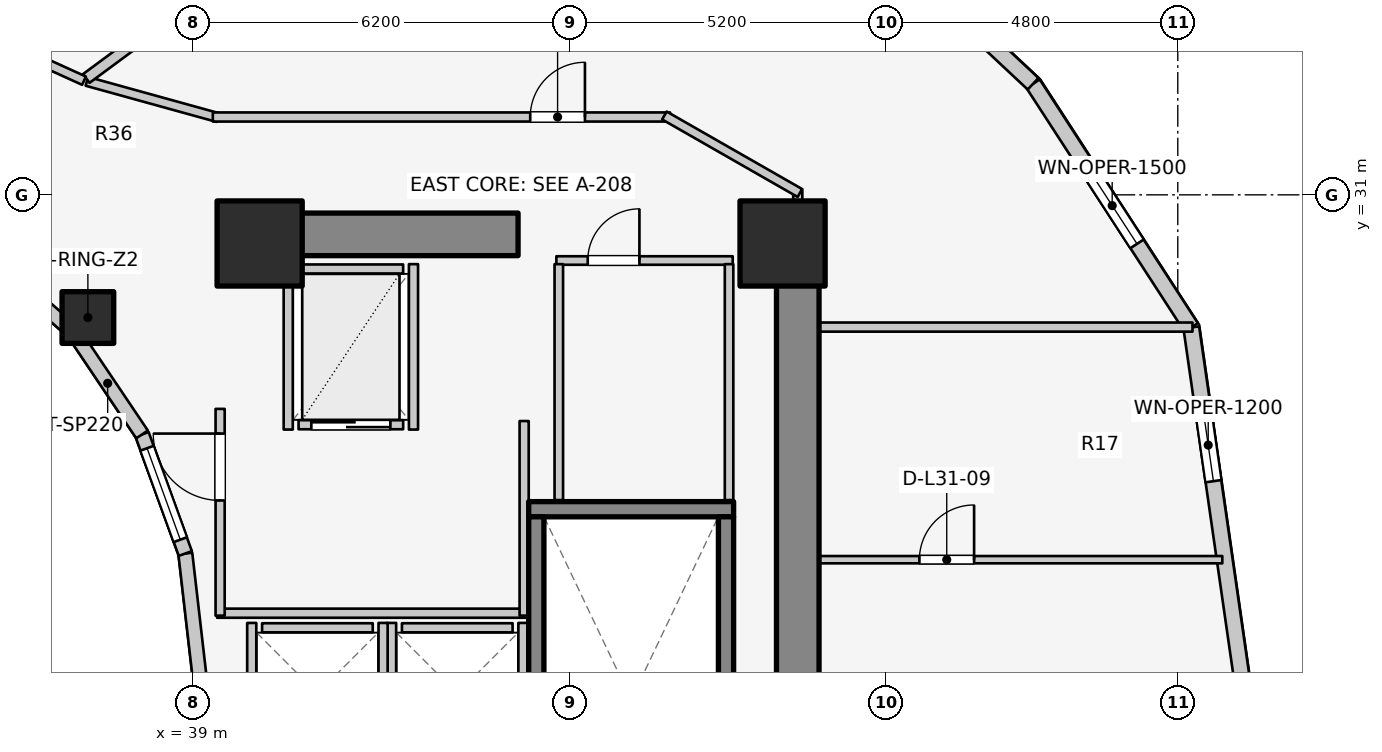
"""IFC4 building model, lengths in metres.
Left out: names, types, materials, properties, quantities, classifications, styles, units other than length and angle.
Written with IfcOpenShell. Run it as: python <this file> out.ifc"""

import sys

from ifc_helpers import new_model, si_unit, direction, frame, frame_2d, origin, origin_2d, place, context, subcontext, project, spatial, rectangle, extrude, element, fill, save


model = new_model("IFC4")
c1 = context("Model", 3, precision=1e-05, world=origin(), true_north=direction((0.0, 1.0)))
c2 = subcontext(c1, "Body", "Model", "MODEL_VIEW")
j1 = project(units=[si_unit("LENGTHUNIT", "METRE"), si_unit("PLANEANGLEUNIT", "RADIAN")], contexts=[c1])
p1 = place(None, origin())
s1 = spatial("IfcSite", under=j1, at=p1, CompositionType="ELEMENT")
p2 = place(p1, origin())
s2 = spatial("IfcBuilding", under=s1, at=p2, CompositionType="ELEMENT")
p3 = place(p2, frame((0.0, 0.0, 104.2)))
s3 = spatial("IfcBuildingStorey", under=s2, at=p3, CompositionType="ELEMENT", Elevation=104.2)
p4 = place(p3, frame((48.95, 17.05, 0.0), z_axis=(0.0, 0.0, 1.0), x_axis=(0.0, 1.0, 0.0)))
e1 = element("IfcWall", 1, at=p4, inside=s3, PredefinedType="SHEAR", context=c2, shape_type="SweptSolid", body=[
    extrude(rectangle(XDim=12.8, YDim=0.7, at=frame_2d((6.4, 0.0))), origin(), (0.0, 0.0, 1.0), 3.1),
])
p5 = place(p3, frame((39.85, 30.35, 0.0), z_axis=(0.0, 0.0, 1.0), x_axis=(1.0, 0.0, 0.0)))
e2 = element("IfcWall", 2, at=p5, inside=s3, PredefinedType="SHEAR", context=c2, shape_type="SweptSolid", body=[
    extrude(rectangle(XDim=4.5, YDim=0.7, at=frame_2d((2.25, 0.0))), origin(), (0.0, 0.0, 1.0), 3.1),
])
p6 = place(p3, frame((44.525, 25.83, 0.0), z_axis=(0.0, 0.0, 1.0), x_axis=(1.0, 0.0, 0.0)))
e3 = element("IfcWall", 3, at=p6, inside=s3, PredefinedType="SOLIDWALL", context=c2, shape_type="SweptSolid", body=[
    extrude(rectangle(XDim=3.37, YDim=0.25, at=frame_2d((1.685, 0.0))), origin(), (0.0, 0.0, 1.0), 3.1),
])
for number, where, z_axis, x_axis in (
    (4, (44.65, 17.895, 0.0), (0.0, 0.0, 1.0), (0.0, 1.0, 0.0)),
    (5, (47.77, 17.895, 0.0), (0.0, 0.0, 1.0), (0.0, 1.0, 0.0)),
):
    element("IfcWall", number, at=place(p3, frame(where, z_axis=z_axis, x_axis=x_axis)), inside=s3, PredefinedType="SOLIDWALL", context=c2, shape_type="SweptSolid", body=[
        extrude(rectangle(XDim=7.81, YDim=0.25, at=frame_2d((3.905, 0.0))), origin(), (0.0, 0.0, 1.0), 3.1),
    ])
for number, where, z_axis, x_axis in (
    (6, (48.7, 30.2, 0.0), (0.0, 0.0, 1.0), (1.0, 0.0, 0.0)),
    (7, (40.1, 30.2, 0.0), (0.0, 0.0, 1.0), (1.0, 0.0, 0.0)),
):
    element("IfcColumn", number, at=place(p3, frame(where, z_axis=z_axis, x_axis=x_axis)), inside=s3, PredefinedType="COLUMN", context=c2, shape_type="SweptSolid", body=[
        extrude(rectangle(XDim=1.4, YDim=1.4, at=origin_2d()), origin(), (0.0, 0.0, 1.0), 3.1),
    ])
p7 = place(p3, frame((37.275, 28.982, 0.0), z_axis=(0.0, 0.0, 1.0), x_axis=(1.0, 0.0, 0.0)))
e8 = element("IfcColumn", 8, at=p7, inside=s3, PredefinedType="COLUMN", context=c2, shape_type="SweptSolid", body=[
    extrude(rectangle(XDim=0.85, YDim=0.85, at=origin_2d()), origin(), (0.0, 0.0, 1.0), 3.1),
])
p8 = place(p3, frame((39.12, 23.0, 0.0), z_axis=(0.0, 0.0, 1.0), x_axis=(-0.114711713601, 0.993398823617, 0.0)))
e9 = element("IfcWall", 9, at=p8, inside=s3, PredefinedType="STANDARD", context=c2, shape_type="SweptSolid", body=[
    extrude(rectangle(XDim=2.115, YDim=0.23, at=frame_2d((1.058, 0.0))), origin(), (0.0, 0.0, 1.0), 2.84),
])
p9 = place(p3, frame((38.877, 25.102, 0.0), z_axis=(0.0, 0.0, 1.0), x_axis=(-0.341423187295, 0.93990968033, 0.0)))
e10 = element("IfcWall", 10, at=p9, inside=s3, PredefinedType="STANDARD", context=c2, shape_type="SweptSolid", body=[
    extrude(rectangle(XDim=2.084, YDim=0.23, at=frame_2d((1.042, 0.0))), origin(), (0.0, 0.0, 1.0), 2.84),
])
p10 = place(p9, frame((0.242, 0.0, 0.85)))
e11 = element("IfcOpeningElement", 11, at=p10, cuts=e10, PredefinedType="OPENING", context=c2, shape_type="SweptSolid", body=[
    extrude(rectangle(XDim=1.6, YDim=1.65, at=frame_2d((0.8, 0.825))), frame((0.0, 0.125, 0.0), z_axis=(0.0, -1.0, 0.0), x_axis=(1.0, 0.0, 0.0)), (0.0, 0.0, 1.0), 0.25),
])
p11 = place(p3, frame((38.166, 27.06, 0.0), z_axis=(0.0, 0.0, 1.0), x_axis=(-0.558197800898, 0.829707909492, 0.0)))
e12 = element("IfcWall", 12, at=p11, inside=s3, PredefinedType="STANDARD", context=c2, shape_type="SweptSolid", body=[
    extrude(rectangle(XDim=2.027, YDim=0.23, at=frame_2d((1.013, 0.0))), origin(), (0.0, 0.0, 1.0), 2.16),
])
p12 = place(p3, frame((37.035, 28.742, 0.0), z_axis=(0.0, 0.0, 1.0), x_axis=(-0.752576694707, 0.658504607869, 0.0)))
e13 = element("IfcWall", 13, at=p12, inside=s3, PredefinedType="STANDARD", context=c2, shape_type="SweptSolid", body=[
    extrude(rectangle(XDim=1.959, YDim=0.23, at=frame_2d((0.98, 0.0))), origin(), (0.0, 0.0, 1.0), 2.16),
])
p13 = place(p3, frame((56.26, 23.0, 0.0), z_axis=(0.0, 0.0, 1.0), x_axis=(-0.142572472068, 0.98978436551, 0.0)))
e14 = element("IfcWall", 14, at=p13, inside=s3, PredefinedType="STANDARD", context=c2, shape_type="SweptSolid", body=[
    extrude(rectangle(XDim=5.879, YDim=0.26, at=frame_2d((2.939, 0.0))), origin(), (0.0, 0.0, 1.0), 2.85),
])
p14 = place(p13, frame((3.325, 0.0, 0.75)))
e15 = element("IfcOpeningElement", 15, at=p14, cuts=e14, PredefinedType="OPENING", context=c2, shape_type="SweptSolid", body=[
    extrude(rectangle(XDim=1.2, YDim=1.5, at=frame_2d((0.6, 0.75))), frame((0.0, 0.14, 0.0), z_axis=(0.0, -1.0, 0.0), x_axis=(1.0, 0.0, 0.0)), (0.0, 0.0, 1.0), 0.28),
])
p15 = place(p3, frame((55.422, 28.819, 0.0), z_axis=(0.0, 0.0, 1.0), x_axis=(-0.544388392991, 0.838833283541, 0.0)))
e16 = element("IfcWall", 16, at=p15, inside=s3, PredefinedType="STANDARD", context=c2, shape_type="SweptSolid", body=[
    extrude(rectangle(XDim=4.778, YDim=0.26, at=frame_2d((2.389, 0.0))), origin(), (0.0, 0.0, 1.0), 2.85),
])
p16 = place(p15, frame((1.639, 0.0, 0.75)))
e17 = element("IfcOpeningElement", 17, at=p16, cuts=e16, PredefinedType="OPENING", context=c2, shape_type="SweptSolid", body=[
    extrude(rectangle(XDim=1.5, YDim=1.6, at=frame_2d((0.75, 0.8))), frame((0.0, 0.14, 0.0), z_axis=(0.0, -1.0, 0.0), x_axis=(1.0, 0.0, 0.0)), (0.0, 0.0, 1.0), 0.28),
])
p17 = place(p3, frame((52.821, 32.827, 0.0), z_axis=(0.0, 0.0, 1.0), x_axis=(-0.730162452258, 0.68327358599, 0.0)))
e18 = element("IfcWall", 18, at=p17, inside=s3, PredefinedType="STANDARD", context=c2, shape_type="SweptSolid", body=[
    extrude(rectangle(XDim=4.868, YDim=0.26, at=frame_2d((2.434, 0.0))), origin(), (0.0, 0.0, 1.0), 2.85),
])
p18 = place(p17, frame((1.234, 0.0, 0.75)))
e19 = element("IfcOpeningElement", 19, at=p18, cuts=e18, PredefinedType="OPENING", context=c2, shape_type="SweptSolid", body=[
    extrude(rectangle(XDim=2.4, YDim=1.7, at=frame_2d((1.2, 0.85))), frame((0.0, 0.14, 0.0), z_axis=(0.0, -1.0, 0.0), x_axis=(1.0, 0.0, 0.0)), (0.0, 0.0, 1.0), 0.28),
])
p19 = place(p3, frame((42.44, 23.88, 0.0), z_axis=(0.0, 0.0, 1.0), x_axis=(1.0, 0.0, 0.0)))
e20 = element("IfcWall", 20, at=p19, inside=s3, PredefinedType="SOLIDWALL", context=c2, shape_type="SweptSolid", body=[
    extrude(rectangle(XDim=1.82, YDim=0.15, at=frame_2d((0.91, 0.0))), origin(), (0.0, 0.0, 1.0), 2.855),
])
for number, where, z_axis, x_axis in (
    (21, (42.27, 21.64, 0.0), (0.0, 0.0, 1.0), (0.0, 1.0, 0.0)),
    (22, (44.43, 21.64, 0.0), (0.0, 0.0, 1.0), (0.0, 1.0, 0.0)),
):
    element("IfcWall", number, at=place(p3, frame(where, z_axis=z_axis, x_axis=x_axis)), inside=s3, PredefinedType="SOLIDWALL", context=c2, shape_type="SweptSolid", body=[
        extrude(rectangle(XDim=2.32, YDim=0.15, at=frame_2d((1.16, 0.0))), origin(), (0.0, 0.0, 1.0), 2.855),
    ])
p20 = place(p3, frame((40.14, 23.88, 0.0), z_axis=(0.0, 0.0, 1.0), x_axis=(1.0, 0.0, 0.0)))
e23 = element("IfcWall", 23, at=p20, inside=s3, PredefinedType="SOLIDWALL", context=c2, shape_type="SweptSolid", body=[
    extrude(rectangle(XDim=1.82, YDim=0.15, at=frame_2d((0.91, 0.0))), origin(), (0.0, 0.0, 1.0), 2.12),
])
p21 = place(p3, frame((39.97, 21.64, 0.0), z_axis=(0.0, 0.0, 1.0), x_axis=(0.0, 1.0, 0.0)))
e24 = element("IfcWall", 24, at=p21, inside=s3, PredefinedType="SOLIDWALL", context=c2, shape_type="SweptSolid", body=[
    extrude(rectangle(XDim=2.32, YDim=0.15, at=frame_2d((1.16, 0.0))), origin(), (0.0, 0.0, 1.0), 2.12),
])
p22 = place(p3, frame((42.13, 21.64, 0.0), z_axis=(0.0, 0.0, 1.0), x_axis=(0.0, 1.0, 0.0)))
e25 = element("IfcWall", 25, at=p22, inside=s3, PredefinedType="SOLIDWALL", context=c2, shape_type="SweptSolid", body=[
    extrude(rectangle(XDim=2.32, YDim=0.15, at=frame_2d((1.16, 0.0))), origin(), (0.0, 0.0, 1.0), 2.855),
])
p23 = place(p3, frame((40.74, 27.22, 0.0), z_axis=(0.0, 0.0, 1.0), x_axis=(1.0, 0.0, 0.0)))
e26 = element("IfcWall", 26, at=p23, inside=s3, PredefinedType="SOLIDWALL", context=c2, shape_type="SweptSolid", body=[
    extrude(rectangle(XDim=1.72, YDim=0.15, at=frame_2d((0.86, 0.0))), origin(), (0.0, 0.0, 1.0), 2.855),
])
p24 = place(p23, frame((0.21, 0.0, 0.0)))
e27 = element("IfcOpeningElement", 27, at=p24, cuts=e26, PredefinedType="OPENING", context=c2, shape_type="SweptSolid", body=[
    extrude(rectangle(XDim=1.3, YDim=2.1, at=frame_2d((0.65, 1.05))), frame((0.0, 0.085, 0.0), z_axis=(0.0, -1.0, 0.0), x_axis=(1.0, 0.0, 0.0)), (0.0, 0.0, 1.0), 0.17),
])
p25 = place(p3, frame((40.74, 29.78, 0.0), z_axis=(0.0, 0.0, 1.0), x_axis=(1.0, 0.0, 0.0)))
e28 = element("IfcWall", 28, at=p25, inside=s3, PredefinedType="SOLIDWALL", context=c2, shape_type="SweptSolid", body=[
    extrude(rectangle(XDim=1.72, YDim=0.15, at=frame_2d((0.86, 0.0))), origin(), (0.0, 0.0, 1.0), 2.855),
])
for number, where, z_axis, x_axis in (
    (29, (40.57, 27.14, 0.0), (0.0, 0.0, 1.0), (0.0, 1.0, 0.0)),
    (30, (42.63, 27.14, 0.0), (0.0, 0.0, 1.0), (0.0, 1.0, 0.0)),
):
    element("IfcWall", number, at=place(p3, frame(where, z_axis=z_axis, x_axis=x_axis)), inside=s3, PredefinedType="SOLIDWALL", context=c2, shape_type="SweptSolid", body=[
        extrude(rectangle(XDim=2.72, YDim=0.15, at=frame_2d((1.36, 0.0))), origin(), (0.0, 0.0, 1.0), 2.855),
    ])
p26 = place(p3, frame((39.4, 24.12, 0.0), z_axis=(0.0, 0.0, 1.0), x_axis=(1.0, 0.0, 0.0)))
e31 = element("IfcWall", 31, at=p26, inside=s3, PredefinedType="PARTITIONING", context=c2, shape_type="SweptSolid", body=[
    extrude(rectangle(XDim=5.08, YDim=0.15, at=frame_2d((2.54, 0.0))), origin(), (0.0, 0.0, 1.0), 2.12),
])
p27 = place(p3, frame((44.45, 24.08, 0.0), z_axis=(0.0, 0.0, 1.0), x_axis=(0.0, 1.0, 0.0)))
e32 = element("IfcWall", 32, at=p27, inside=s3, PredefinedType="PARTITIONING", context=c2, shape_type="SweptSolid", body=[
    extrude(rectangle(XDim=3.2, YDim=0.15, at=frame_2d((1.6, 0.0))), origin(), (0.0, 0.0, 1.0), 2.855),
])
p28 = place(p3, frame((39.45, 24.08, 0.0), z_axis=(0.0, 0.0, 1.0), x_axis=(0.0, 1.0, 0.0)))
e33 = element("IfcWall", 33, at=p28, inside=s3, PredefinedType="PARTITIONING", context=c2, shape_type="SweptSolid", body=[
    extrude(rectangle(XDim=3.4, YDim=0.15, at=frame_2d((1.7, 0.0))), origin(), (0.0, 0.0, 1.0), 2.855),
])
p29 = place(p28, frame((1.894, 0.0, 0.0)))
e34 = element("IfcOpeningElement", 34, at=p29, cuts=e33, PredefinedType="OPENING", context=c2, shape_type="SweptSolid", body=[
    extrude(rectangle(XDim=1.1, YDim=2.1, at=frame_2d((0.55, 1.05))), frame((0.0, 0.085, 0.0), z_axis=(0.0, -1.0, 0.0), x_axis=(1.0, 0.0, 0.0)), (0.0, 0.0, 1.0), 0.17),
])
p30 = place(p3, frame((44.98, 29.92, 0.0), z_axis=(0.0, 0.0, 1.0), x_axis=(1.0, 0.0, 0.0)))
e35 = element("IfcWall", 35, at=p30, inside=s3, PredefinedType="PLUMBINGWALL", context=c2, shape_type="SweptSolid", body=[
    extrude(rectangle(XDim=2.9, YDim=0.14, at=frame_2d((1.45, 0.0))), origin(), (0.0, 0.0, 1.0), 2.855),
])
p31 = place(p30, frame((0.516, 0.0, 0.0)))
e36 = element("IfcOpeningElement", 36, at=p31, cuts=e35, PredefinedType="OPENING", context=c2, shape_type="SweptSolid", body=[
    extrude(rectangle(XDim=0.85, YDim=2.05, at=frame_2d((0.425, 1.025))), frame((0.0, 0.08, 0.0), z_axis=(0.0, -1.0, 0.0), x_axis=(1.0, 0.0, 0.0)), (0.0, 0.0, 1.0), 0.16),
])
for number, where, z_axis, x_axis in (
    (37, (45.02, 25.98, 0.0), (0.0, 0.0, 1.0), (0.0, 1.0, 0.0)),
    (38, (47.82, 25.98, 0.0), (0.0, 0.0, 1.0), (0.0, 1.0, 0.0)),
):
    element("IfcWall", number, at=place(p3, frame(where, z_axis=z_axis, x_axis=x_axis)), inside=s3, PredefinedType="PLUMBINGWALL", context=c2, shape_type="SweptSolid", body=[
        extrude(rectangle(XDim=3.88, YDim=0.14, at=frame_2d((1.94, 0.0))), origin(), (0.0, 0.0, 1.0), 2.855),
    ])
p32 = place(p3, frame((48.95, 28.825, 0.0), z_axis=(0.0, 0.0, 1.0), x_axis=(1.0, 0.0, 0.0)))
e39 = element("IfcWall", 39, at=p32, inside=s3, PredefinedType="PARTITIONING", context=c2, shape_type="SweptSolid", body=[
    extrude(rectangle(XDim=6.492, YDim=0.15, at=frame_2d((3.246, 0.0))), origin(), (0.0, 0.0, 1.0), 2.855),
])
p33 = place(p3, frame((48.95, 25.0, 0.0), z_axis=(0.0, 0.0, 1.0), x_axis=(1.0, 0.0, 0.0)))
e40 = element("IfcWall", 40, at=p33, inside=s3, PredefinedType="MOVABLE", context=c2, shape_type="SweptSolid", body=[
    extrude(rectangle(XDim=6.982, YDim=0.12, at=frame_2d((3.491, 0.0))), origin(), (0.0, 0.0, 1.0), 2.855),
])
p34 = place(p33, frame((2.0, 0.0, 0.0)))
e41 = element("IfcOpeningElement", 41, at=p34, cuts=e40, PredefinedType="OPENING", context=c2, shape_type="SweptSolid", body=[
    extrude(rectangle(XDim=0.9, YDim=2.1, at=frame_2d((0.45, 1.05))), frame((0.0, 0.07, 0.0), z_axis=(0.0, -1.0, 0.0), x_axis=(1.0, 0.0, 0.0)), (0.0, 0.0, 1.0), 0.14),
])
p35 = place(p3, frame((48.95, 29.8, 0.0), z_axis=(0.0, 0.0, 1.0), x_axis=(0.0, 1.0, 0.0)))
e42 = element("IfcWall", 42, at=p35, inside=s3, PredefinedType="PARTITIONING", context=c2, shape_type="SweptSolid", body=[
    extrude(rectangle(XDim=1.29, YDim=0.15, at=frame_2d((0.645, 0.0))), origin(), (0.0, 0.0, 1.0), 2.142),
])
p36 = place(p3, frame((37.258, 32.867, 0.0), z_axis=(0.0, 0.0, 1.0), x_axis=(0.963833843713, -0.266503886865, 0.0)))
e43 = element("IfcWall", 43, at=p36, inside=s3, PredefinedType="PARTITIONING", context=c2, shape_type="SweptSolid", body=[
    extrude(rectangle(XDim=2.232, YDim=0.15, at=frame_2d((1.116, 0.0))), origin(), (0.0, 0.0, 1.0), 2.272),
])
p37 = place(p3, frame((39.33, 32.28, 0.0), z_axis=(0.0, 0.0, 1.0), x_axis=(1.0, 0.0, 0.0)))
e44 = element("IfcWall", 44, at=p37, inside=s3, PredefinedType="PARTITIONING", context=c2, shape_type="SweptSolid", body=[
    extrude(rectangle(XDim=7.52, YDim=0.15, at=frame_2d((3.76, 0.0))), origin(), (0.0, 0.0, 1.0), 2.272),
])
p38 = place(p37, frame((5.22, 0.0, 0.0)))
e45 = element("IfcOpeningElement", 45, at=p38, cuts=e44, PredefinedType="OPENING", context=c2, shape_type="SweptSolid", body=[
    extrude(rectangle(XDim=0.9, YDim=2.1, at=frame_2d((0.45, 1.05))), frame((0.0, 0.085, 0.0), z_axis=(0.0, -1.0, 0.0), x_axis=(1.0, 0.0, 0.0)), (0.0, 0.0, 1.0), 0.17),
])
p39 = place(p3, frame((46.757, 32.305, 0.0), z_axis=(0.0, 0.0, 1.0), x_axis=(0.867991349648, -0.496579315857, 0.0)))
e46 = element("IfcWall", 46, at=p39, inside=s3, PredefinedType="PARTITIONING", context=c2, shape_type="SweptSolid", body=[
    extrude(rectangle(XDim=2.567, YDim=0.15, at=frame_2d((1.283, 0.0))), origin(), (0.0, 0.0, 1.0), 2.142),
])
p40 = place(p3, frame((37.249, 32.914, 0.0), z_axis=(0.0, 0.0, 1.0), x_axis=(0.80430981394, 0.594210167533, 0.0)))
e47 = element("IfcWall", 47, at=p40, inside=s3, PredefinedType="PARTITIONING", context=c2, shape_type="SweptSolid", body=[
    extrude(rectangle(XDim=9.146, YDim=0.18, at=frame_2d((4.573, 0.0))), origin(), (0.0, 0.0, 1.0), 2.272),
])
p41 = place(p3, frame((37.211, 32.877, 0.0), z_axis=(0.0, 0.0, 1.0), x_axis=(-0.910568469686, 0.41335827319, 0.0)))
e48 = element("IfcWall", 48, at=p41, inside=s3, PredefinedType="PARTITIONING", context=c2, shape_type="SweptSolid", body=[
    extrude(rectangle(XDim=2.772, YDim=0.15, at=frame_2d((1.386, 0.0))), origin(), (0.0, 0.0, 1.0), 2.272),
])
p42 = place(p41, frame((0.911, 0.0, 0.0)))
e49 = element("IfcOpeningElement", 49, at=p42, cuts=e48, PredefinedType="OPENING", context=c2, shape_type="SweptSolid", body=[
    extrude(rectangle(XDim=0.95, YDim=2.1, at=frame_2d((0.475, 1.05))), frame((0.0, 0.085, 0.0), z_axis=(0.0, -1.0, 0.0), x_axis=(1.0, 0.0, 0.0)), (0.0, 0.0, 1.0), 0.17),
])
p43 = place(p10, origin())
e50 = element("IfcWindow", 50, at=p43, inside=s3, PartitioningType="SINGLE_PANEL", PredefinedType="WINDOW", context=c2, shape_type="SweptSolid", body=[
    extrude(rectangle(XDim=1.6, YDim=1.65, at=frame_2d((0.8, 0.825))), frame((0.0, 0.03, 0.0), z_axis=(0.0, -1.0, 0.0), x_axis=(1.0, 0.0, 0.0)), (0.0, 0.0, 1.0), 0.06),
])
fill(e11, e50)
p44 = place(p14, origin())
e51 = element("IfcWindow", 51, at=p44, inside=s3, PartitioningType="SINGLE_PANEL", PredefinedType="WINDOW", context=c2, shape_type="SweptSolid", body=[
    extrude(rectangle(XDim=1.2, YDim=1.5, at=frame_2d((0.6, 0.75))), frame((0.0, 0.03, 0.0), z_axis=(0.0, -1.0, 0.0), x_axis=(1.0, 0.0, 0.0)), (0.0, 0.0, 1.0), 0.06),
])
fill(e15, e51)
p45 = place(p16, origin())
e52 = element("IfcWindow", 52, at=p45, inside=s3, PartitioningType="SINGLE_PANEL", PredefinedType="WINDOW", context=c2, shape_type="SweptSolid", body=[
    extrude(rectangle(XDim=1.5, YDim=1.6, at=frame_2d((0.75, 0.8))), frame((0.0, 0.03, 0.0), z_axis=(0.0, -1.0, 0.0), x_axis=(1.0, 0.0, 0.0)), (0.0, 0.0, 1.0), 0.06),
])
fill(e17, e52)
p46 = place(p24, origin())
e53 = element("IfcDoor", 53, at=p46, inside=s3, OperationType="DOUBLE_DOOR_SLIDING", PredefinedType="DOOR", context=c2, shape_type="SweptSolid", body=[
    extrude(rectangle(XDim=1.3, YDim=2.1, at=frame_2d((0.65, 1.05))), frame((0.0, 0.025, 0.0), z_axis=(0.0, -1.0, 0.0), x_axis=(1.0, 0.0, 0.0)), (0.0, 0.0, 1.0), 0.05),
])
fill(e27, e53)
p47 = place(p29, origin())
e54 = element("IfcDoor", 54, at=p47, inside=s3, OperationType="SINGLE_SWING_RIGHT", PredefinedType="DOOR", context=c2, shape_type="SweptSolid", body=[
    extrude(rectangle(XDim=1.1, YDim=2.1, at=frame_2d((0.55, 1.05))), frame((0.0, 0.025, 0.0), z_axis=(0.0, -1.0, 0.0), x_axis=(1.0, 0.0, 0.0)), (0.0, 0.0, 1.0), 0.05),
])
fill(e34, e54)
p48 = place(p31, origin())
e55 = element("IfcDoor", 55, at=p48, inside=s3, OperationType="SINGLE_SWING_RIGHT", PredefinedType="DOOR", context=c2, shape_type="SweptSolid", body=[
    extrude(rectangle(XDim=0.85, YDim=2.05, at=frame_2d((0.425, 1.025))), frame((0.0, 0.025, 0.0), z_axis=(0.0, -1.0, 0.0), x_axis=(1.0, 0.0, 0.0)), (0.0, 0.0, 1.0), 0.05),
])
fill(e36, e55)
p49 = place(p34, origin())
e56 = element("IfcDoor", 56, at=p49, inside=s3, OperationType="SINGLE_SWING_RIGHT", PredefinedType="DOOR", context=c2, shape_type="SweptSolid", body=[
    extrude(rectangle(XDim=0.9, YDim=2.1, at=frame_2d((0.45, 1.05))), frame((0.0, 0.025, 0.0), z_axis=(0.0, -1.0, 0.0), x_axis=(1.0, 0.0, 0.0)), (0.0, 0.0, 1.0), 0.05),
])
fill(e41, e56)
p50 = place(p38, origin())
e57 = element("IfcDoor", 57, at=p50, inside=s3, OperationType="SINGLE_SWING_RIGHT", PredefinedType="DOOR", context=c2, shape_type="SweptSolid", body=[
    extrude(rectangle(XDim=0.9, YDim=2.1, at=frame_2d((0.45, 1.05))), frame((0.0, 0.025, 0.0), z_axis=(0.0, -1.0, 0.0), x_axis=(1.0, 0.0, 0.0)), (0.0, 0.0, 1.0), 0.05),
])
fill(e45, e57)
save(model, sys.argv[1])
